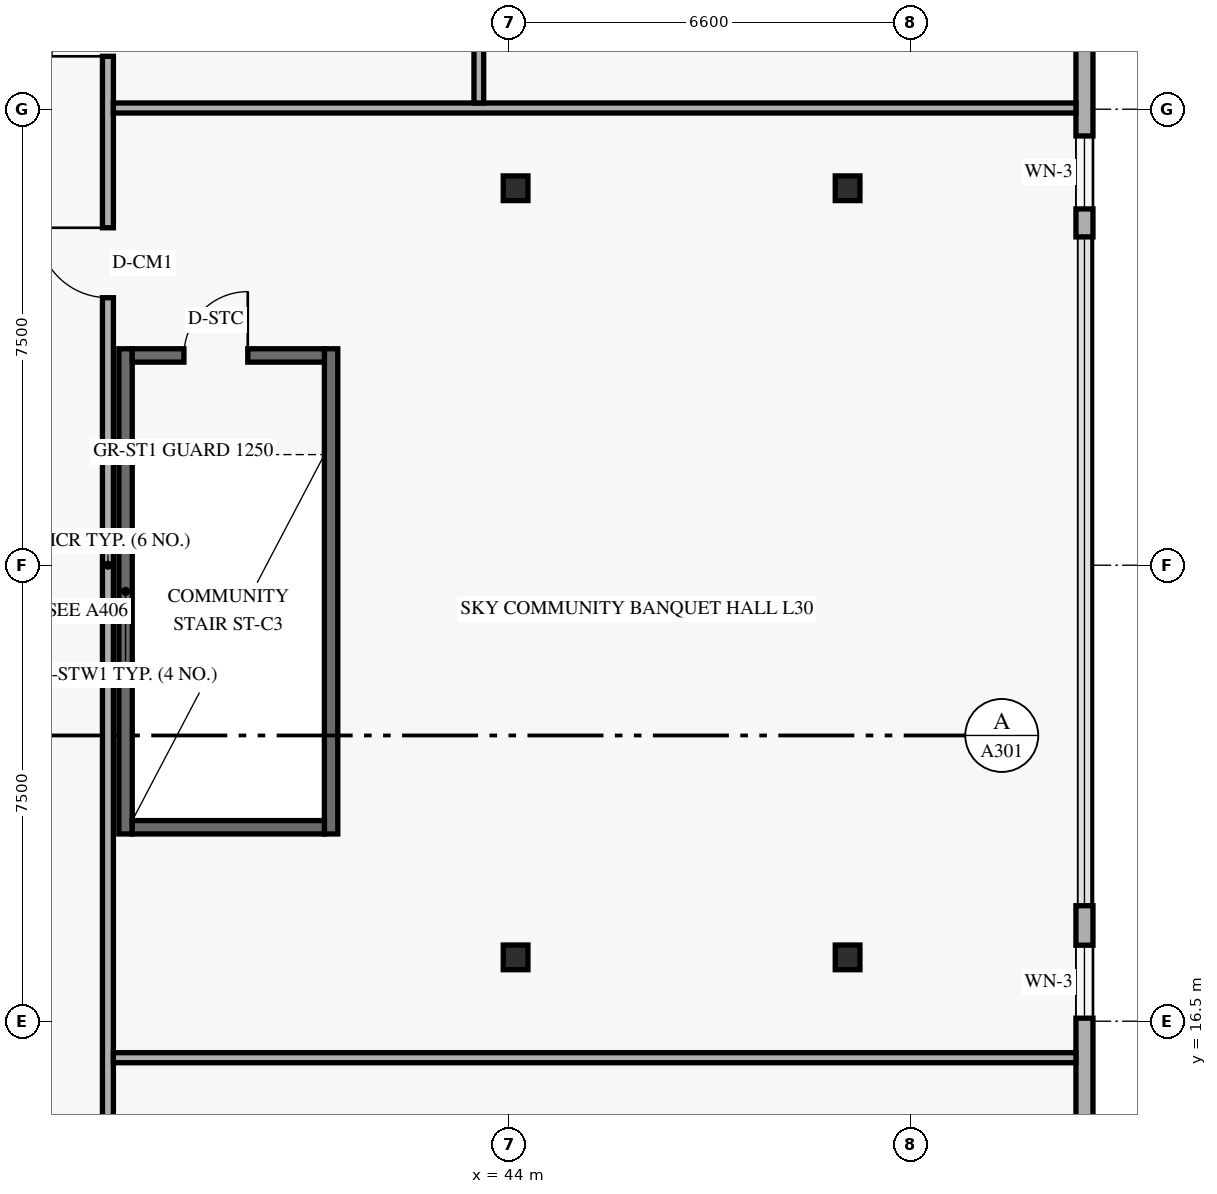
"""IFC4 building model, lengths in metres.
Left out: names, types, materials, properties, quantities, classifications, styles, units other than length and angle.
Written with IfcOpenShell. Run it as: python <this file> out.ifc"""

import sys

from ifc_helpers import new_model, si_unit, direction, frame, frame_2d, origin, origin_2d, place, context, subcontext, project, spatial, rectangle, hollow_rectangle, extrude, element, fill, save


model = new_model("IFC4")
c1 = context("Model", 3, precision=1e-05, world=origin(), true_north=direction((0.0, 1.0)))
c2 = subcontext(c1, "Body", "Model", "MODEL_VIEW")
j1 = project(units=[si_unit("LENGTHUNIT", "METRE"), si_unit("PLANEANGLEUNIT", "RADIAN")], contexts=[c1])
p1 = place(None, origin())
s1 = spatial("IfcSite", under=j1, at=p1, CompositionType="ELEMENT")
p2 = place(p1, origin())
s2 = spatial("IfcBuilding", under=s1, at=p2, CompositionType="ELEMENT")
p3 = place(p2, frame((0.0, 0.0, 117.0)))
s3 = spatial("IfcBuildingStorey", under=s2, at=p3, CompositionType="ELEMENT", Elevation=117.0)
for number, where, z_axis, x_axis in (
    (1, (37.69, 19.58, 0.0), (0.0, 0.0, 1.0), (0.0, 1.0, 0.0)),
    (2, (41.07, 19.58, 0.0), (0.0, 0.0, 1.0), (0.0, 1.0, 0.0)),
):
    element("IfcWall", number, at=place(p3, frame(where, z_axis=z_axis, x_axis=x_axis)), inside=s3, PredefinedType="SHEAR", context=c2, shape_type="SweptSolid", body=[
        extrude(rectangle(XDim=7.98, YDim=0.22, at=frame_2d((3.99, 0.0))), origin(), (0.0, 0.0, 1.0), 3.96),
    ])
p4 = place(p3, frame((37.8, 19.69, 0.0), z_axis=(0.0, 0.0, 1.0), x_axis=(1.0, 0.0, 0.0)))
e3 = element("IfcWall", 3, at=p4, inside=s3, PredefinedType="SHEAR", context=c2, shape_type="SweptSolid", body=[
    extrude(rectangle(XDim=3.16, YDim=0.22, at=frame_2d((1.58, 0.0))), origin(), (0.0, 0.0, 1.0), 3.96),
])
p5 = place(p3, frame((37.8, 27.45, 0.0), z_axis=(0.0, 0.0, 1.0), x_axis=(1.0, 0.0, 0.0)))
e4 = element("IfcWall", 4, at=p5, inside=s3, PredefinedType="SHEAR", context=c2, shape_type="SweptSolid", body=[
    extrude(rectangle(XDim=3.16, YDim=0.22, at=frame_2d((1.58, 0.0))), origin(), (0.0, 0.0, 1.0), 3.96),
])
p6 = place(p5, frame((0.85, 0.0, 0.0)))
e5 = element("IfcOpeningElement", 5, at=p6, cuts=e4, PredefinedType="OPENING", context=c2, shape_type="SweptSolid", body=[
    extrude(rectangle(XDim=1.05, YDim=2.15, at=frame_2d((0.525, 1.075))), frame((0.0, 0.12, 0.0), z_axis=(0.0, -1.0, 0.0), x_axis=(1.0, 0.0, 0.0)), (0.0, 0.0, 1.0), 0.24),
])
for number, where, z_axis, x_axis in (
    (6, (44.031, 17.55, 0.0), (0.035, 0.0, 0.999), (0.0, 1.0, 0.0)),
    (7, (44.031, 30.2, 0.0), (0.035, 0.0, 0.999), (0.0, 1.0, 0.0)),
):
    element("IfcColumn", number, at=place(p3, frame(where, z_axis=z_axis, x_axis=x_axis)), inside=s3, PredefinedType="COLUMN", context=c2, shape_type="SweptSolid", body=[
        extrude(hollow_rectangle(XDim=0.406, YDim=0.406, WallThickness=0.016, at=origin_2d()), origin(), (0.0, 0.0, 1.0), 4.203),
    ])
for number, where, z_axis, x_axis in (
    (8, (49.443, 17.55, 0.0), (0.058, 0.0, 0.998), (0.0, 1.0, 0.0)),
    (9, (49.443, 30.2, 0.0), (0.058, 0.0, 0.998), (0.0, 1.0, 0.0)),
):
    element("IfcColumn", number, at=place(p3, frame(where, z_axis=z_axis, x_axis=x_axis)), inside=s3, PredefinedType="COLUMN", context=c2, shape_type="SweptSolid", body=[
        extrude(hollow_rectangle(XDim=0.406, YDim=0.406, WallThickness=0.016, at=origin_2d()), origin(), (0.0, 0.0, 1.0), 4.207),
    ])
p7 = place(p3, frame((53.46, 6.32, 0.0), z_axis=(0.0, 0.0, 1.0), x_axis=(0.0, 1.0, 0.0)))
e10 = element("IfcWall", 10, at=p7, inside=s3, PredefinedType="SOLIDWALL", context=c2, shape_type="SweptSolid", body=[
    extrude(rectangle(XDim=12.08, YDim=0.28, at=frame_2d((6.04, 0.0))), origin(), (0.0, 0.0, 1.0), 3.96),
])
p8 = place(p7, frame((3.59, 0.0, 0.85)))
e11 = element("IfcOpeningElement", 11, at=p8, cuts=e10, PredefinedType="OPENING", context=c2, shape_type="SweptSolid", body=[
    extrude(rectangle(XDim=2.4, YDim=1.9, at=frame_2d((1.2, 0.95))), frame((0.0, 0.15, 0.0), z_axis=(0.0, -1.0, 0.0), x_axis=(1.0, 0.0, 0.0)), (0.0, 0.0, 1.0), 0.3),
])
p9 = place(p7, frame((10.23, 0.0, 0.85)))
e12 = element("IfcOpeningElement", 12, at=p9, cuts=e10, PredefinedType="OPENING", context=c2, shape_type="SweptSolid", body=[
    extrude(rectangle(XDim=1.2, YDim=1.5, at=frame_2d((0.6, 0.75))), frame((0.0, 0.15, 0.0), z_axis=(0.0, -1.0, 0.0), x_axis=(1.0, 0.0, 0.0)), (0.0, 0.0, 1.0), 0.3),
])
p10 = place(p3, frame((53.46, 29.4, 0.0), z_axis=(0.0, 0.0, 1.0), x_axis=(0.0, 1.0, 0.0)))
e13 = element("IfcWall", 13, at=p10, inside=s3, PredefinedType="SOLIDWALL", context=c2, shape_type="SweptSolid", body=[
    extrude(rectangle(XDim=12.28, YDim=0.28, at=frame_2d((6.14, 0.0))), origin(), (0.0, 0.0, 1.0), 3.96),
])
p11 = place(p10, frame((0.46, 0.0, 0.85)))
e14 = element("IfcOpeningElement", 14, at=p11, cuts=e13, PredefinedType="OPENING", context=c2, shape_type="SweptSolid", body=[
    extrude(rectangle(XDim=1.2, YDim=1.5, at=frame_2d((0.6, 0.75))), frame((0.0, 0.15, 0.0), z_axis=(0.0, -1.0, 0.0), x_axis=(1.0, 0.0, 0.0)), (0.0, 0.0, 1.0), 0.3),
])
p12 = place(p10, frame((6.0, 0.0, 0.85)))
e15 = element("IfcOpeningElement", 15, at=p12, cuts=e13, PredefinedType="OPENING", context=c2, shape_type="SweptSolid", body=[
    extrude(rectangle(XDim=2.4, YDim=1.9, at=frame_2d((1.2, 0.95))), frame((0.0, 0.15, 0.0), z_axis=(0.0, -1.0, 0.0), x_axis=(1.0, 0.0, 0.0)), (0.0, 0.0, 1.0), 0.3),
])
p13 = place(p3, frame((37.4, 6.8, 0.0), z_axis=(0.0, 0.0, 1.0), x_axis=(0.0, 1.0, 0.0)))
e16 = element("IfcWall", 16, at=p13, inside=s3, PredefinedType="STANDARD", context=c2, shape_type="SweptSolid", body=[
    extrude(rectangle(XDim=34.4, YDim=0.18, at=frame_2d((17.2, 0.0))), origin(), (0.0, 0.0, 1.0), 3.331),
])
p14 = place(p13, frame((25.57, 0.0, 0.0)))
e17 = element("IfcOpeningElement", 17, at=p14, cuts=e16, PredefinedType="OPENING", context=c2, shape_type="SweptSolid", body=[
    extrude(rectangle(XDim=0.92, YDim=2.14, at=frame_2d((0.46, 1.07))), frame((0.0, 0.1, 0.0), z_axis=(0.0, -1.0, 0.0), x_axis=(1.0, 0.0, 0.0)), (0.0, 0.0, 1.0), 0.2),
])
p15 = place(p13, frame((32.46, 0.0, 0.0)))
e18 = element("IfcOpeningElement", 18, at=p15, cuts=e16, PredefinedType="OPENING", context=c2, shape_type="SweptSolid", body=[
    extrude(rectangle(XDim=0.95, YDim=2.14, at=frame_2d((0.475, 1.07))), frame((0.0, 0.1, 0.0), z_axis=(0.0, -1.0, 0.0), x_axis=(1.0, 0.0, 0.0)), (0.0, 0.0, 1.0), 0.2),
])
p16 = place(p13, frame((2.8, 0.0, 0.0)))
e19 = element("IfcOpeningElement", 19, at=p16, cuts=e16, PredefinedType="OPENING", context=c2, shape_type="SweptSolid", body=[
    extrude(rectangle(XDim=1.15, YDim=2.15, at=frame_2d((0.575, 1.075))), frame((0.0, 0.1, 0.0), z_axis=(0.0, -1.0, 0.0), x_axis=(1.0, 0.0, 0.0)), (0.0, 0.0, 1.0), 0.2),
])
p17 = place(p13, frame((21.6, 0.0, 0.0)))
e20 = element("IfcOpeningElement", 20, at=p17, cuts=e16, PredefinedType="OPENING", context=c2, shape_type="SweptSolid", body=[
    extrude(rectangle(XDim=1.15, YDim=2.15, at=frame_2d((0.575, 1.075))), frame((0.0, 0.1, 0.0), z_axis=(0.0, -1.0, 0.0), x_axis=(1.0, 0.0, 0.0)), (0.0, 0.0, 1.0), 0.2),
])
for number, where, z_axis, x_axis in (
    (21, (37.49, 15.9, 0.0), (0.0, 0.0, 1.0), (1.0, 0.0, 0.0)),
    (22, (37.49, 31.52, 0.0), (0.0, 0.0, 1.0), (1.0, 0.0, 0.0)),
):
    element("IfcWall", number, at=place(p3, frame(where, z_axis=z_axis, x_axis=x_axis)), inside=s3, PredefinedType="PARTITIONING", context=c2, shape_type="SweptSolid", body=[
        extrude(rectangle(XDim=15.83, YDim=0.165, at=frame_2d((7.915, 0.0))), origin(), (0.0, 0.0, 1.0), 3.331),
    ])
p18 = place(p3, frame((43.5, 31.603, 0.0), z_axis=(0.0, 0.0, 1.0), x_axis=(0.0, 1.0, 0.0)))
e23 = element("IfcWall", 23, at=p18, inside=s3, PredefinedType="PLUMBINGWALL", context=c2, shape_type="SweptSolid", body=[
    extrude(rectangle(XDim=13.417, YDim=0.16, at=frame_2d((6.709, 0.0))), origin(), (0.0, 0.0, 1.0), 3.331),
])
p19 = place(p18, frame((1.117, 0.0, 0.0)))
e24 = element("IfcOpeningElement", 24, at=p19, cuts=e23, PredefinedType="OPENING", context=c2, shape_type="SweptSolid", body=[
    extrude(rectangle(XDim=0.95, YDim=2.15, at=frame_2d((0.475, 1.075))), frame((0.0, 0.09, 0.0), z_axis=(0.0, -1.0, 0.0), x_axis=(1.0, 0.0, 0.0)), (0.0, 0.0, 1.0), 0.18),
])
p20 = place(p9, origin())
e25 = element("IfcWindow", 25, at=p20, inside=s3, PartitioningType="SINGLE_PANEL", PredefinedType="WINDOW", context=c2, shape_type="SweptSolid", body=[
    extrude(rectangle(XDim=1.2, YDim=1.5, at=frame_2d((0.6, 0.75))), frame((0.0, 0.03, 0.0), z_axis=(0.0, -1.0, 0.0), x_axis=(1.0, 0.0, 0.0)), (0.0, 0.0, 1.0), 0.06),
])
fill(e12, e25)
p21 = place(p11, origin())
e26 = element("IfcWindow", 26, at=p21, inside=s3, PartitioningType="SINGLE_PANEL", PredefinedType="WINDOW", context=c2, shape_type="SweptSolid", body=[
    extrude(rectangle(XDim=1.2, YDim=1.5, at=frame_2d((0.6, 0.75))), frame((0.0, 0.03, 0.0), z_axis=(0.0, -1.0, 0.0), x_axis=(1.0, 0.0, 0.0)), (0.0, 0.0, 1.0), 0.06),
])
fill(e14, e26)
p22 = place(p6, frame((1.05, 0.0, 0.0), z_axis=(0.0, 0.0, 1.0), x_axis=(-1.0, 0.0, 0.0)))
e27 = element("IfcDoor", 27, at=p22, inside=s3, OperationType="SINGLE_SWING_LEFT", PredefinedType="DOOR", context=c2, shape_type="SweptSolid", body=[
    extrude(rectangle(XDim=1.05, YDim=2.15, at=frame_2d((0.525, 1.075))), frame((0.0, 0.025, 0.0), z_axis=(0.0, -1.0, 0.0), x_axis=(1.0, 0.0, 0.0)), (0.0, 0.0, 1.0), 0.05),
])
fill(e5, e27)
p23 = place(p14, origin())
e28 = element("IfcDoor", 28, at=p23, inside=s3, OperationType="SINGLE_SWING_LEFT", PredefinedType="DOOR", context=c2, shape_type="SweptSolid", body=[
    extrude(rectangle(XDim=0.92, YDim=2.14, at=frame_2d((0.46, 1.07))), frame((0.0, 0.025, 0.0), z_axis=(0.0, -1.0, 0.0), x_axis=(1.0, 0.0, 0.0)), (0.0, 0.0, 1.0), 0.05),
])
fill(e17, e28)
p24 = place(p17, origin())
e29 = element("IfcDoor", 29, at=p24, inside=s3, OperationType="SINGLE_SWING_RIGHT", PredefinedType="DOOR", context=c2, shape_type="SweptSolid", body=[
    extrude(rectangle(XDim=1.15, YDim=2.15, at=frame_2d((0.575, 1.075))), frame((0.0, 0.025, 0.0), z_axis=(0.0, -1.0, 0.0), x_axis=(1.0, 0.0, 0.0)), (0.0, 0.0, 1.0), 0.05),
])
fill(e20, e29)
save(model, sys.argv[1])
